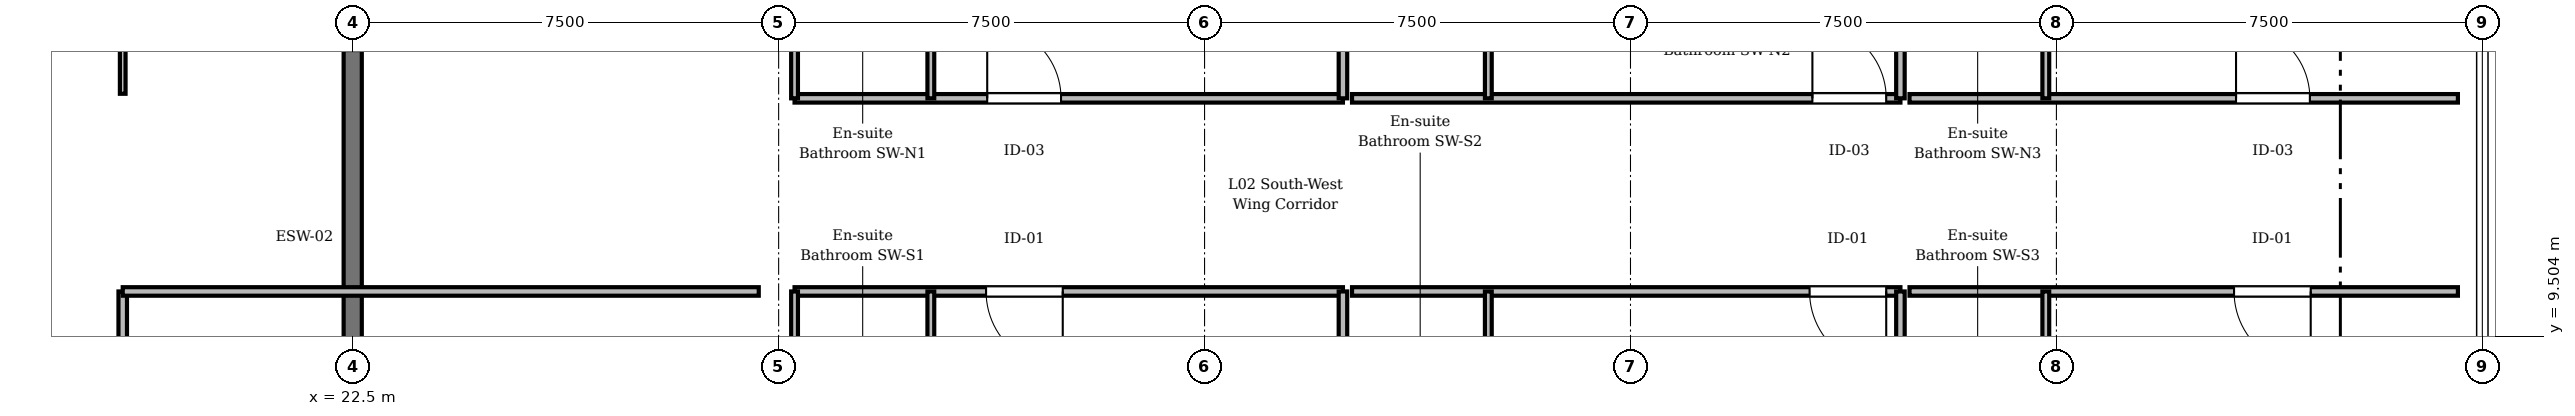
"""IFC4 building model, lengths in metres.
Left out: names, types, materials, properties, quantities, classifications, styles, units other than length and angle.
Written with IfcOpenShell. Run it as: python <this file> out.ifc"""

import sys

from ifc_helpers import new_model, si_unit, direction, frame, frame_2d, origin, place, context, subcontext, project, spatial, rectangle, extrude, element, fill, save


model = new_model("IFC4")
c1 = context("Model", 3, precision=1e-05, world=origin(), true_north=direction((0.0, 1.0)))
c2 = subcontext(c1, "Body", "Model", "MODEL_VIEW")
j1 = project(units=[si_unit("LENGTHUNIT", "METRE"), si_unit("PLANEANGLEUNIT", "RADIAN")], contexts=[c1])
p1 = place(None, origin())
s1 = spatial("IfcSite", under=j1, at=p1, CompositionType="ELEMENT")
p2 = place(p1, origin())
s2 = spatial("IfcBuilding", under=s1, at=p2, CompositionType="ELEMENT")
p3 = place(p2, frame((0.0, 0.0, 9.3)))
s3 = spatial("IfcBuildingStorey", under=s2, at=p3, CompositionType="ELEMENT", Elevation=9.3)
p4 = place(p3, frame((22.5, 7.95, 0.0), z_axis=(0.0, 0.0, 1.0), x_axis=(0.0, 1.0, 0.0)))
e1 = element("IfcWall", 1, at=p4, inside=s3, PredefinedType="SHEAR", context=c2, shape_type="SweptSolid", body=[
    extrude(rectangle(XDim=6.6, YDim=0.32, at=frame_2d((3.3, 0.0))), origin(), (0.0, 0.0, 1.0), 4.0),
])
p5 = place(p3, frame((18.45, 10.3, 0.0), z_axis=(0.0, 0.0, 1.0), x_axis=(0.0, -1.0, 0.0)))
e2 = element("IfcWall", 2, at=p5, inside=s3, PredefinedType="PARTITIONING", context=c2, shape_type="SweptSolid", body=[
    extrude(rectangle(XDim=9.95, YDim=0.15, at=frame_2d((4.975, 0.0))), origin(), (0.0, 0.0, 1.0), 4.535),
])
p6 = place(p5, frame((5.92, 0.0, 0.0)))
e3 = element("IfcOpeningElement", 3, at=p6, cuts=e2, PredefinedType="OPENING", context=c2, shape_type="SweptSolid", body=[
    extrude(rectangle(XDim=1.35, YDim=2.25, at=frame_2d((0.675, 1.125))), frame((0.0, 0.085, 0.0), z_axis=(0.0, -1.0, 0.0), x_axis=(1.0, 0.0, 0.0)), (0.0, 0.0, 1.0), 0.17),
])
p7 = place(p3, frame((18.45, 23.489, 0.0), z_axis=(0.0, 0.0, 1.0), x_axis=(0.0, -1.0, 0.0)))
e4 = element("IfcWall", 4, at=p7, inside=s3, PredefinedType="PARTITIONING", context=c2, shape_type="SweptSolid", body=[
    extrude(rectangle(XDim=9.709, YDim=0.1, at=frame_2d((4.854, 0.0))), origin(), (0.0, 0.0, 1.0), 4.135),
])
p8 = place(p7, frame((4.279, 0.0, 0.0)))
e5 = element("IfcOpeningElement", 5, at=p8, cuts=e4, PredefinedType="OPENING", context=c2, shape_type="SweptSolid", body=[
    extrude(rectangle(XDim=1.15, YDim=2.2, at=frame_2d((0.575, 1.1))), frame((0.0, 0.06, 0.0), z_axis=(0.0, -1.0, 0.0), x_axis=(1.0, 0.0, 0.0)), (0.0, 0.0, 1.0), 0.12),
])
p9 = place(p3, frame((39.937, 10.3, 0.0), z_axis=(0.0, 0.0, 1.0), x_axis=(-1.0, 0.0, 0.0)))
e6 = element("IfcWall", 6, at=p9, inside=s3, PredefinedType="PARTITIONING", context=c2, shape_type="SweptSolid", body=[
    extrude(rectangle(XDim=9.657, YDim=0.15, at=frame_2d((4.828, 0.0))), origin(), (0.0, 0.0, 1.0), 4.535),
])
p10 = place(p9, frame((4.934, 0.0, 0.0)))
e7 = element("IfcOpeningElement", 7, at=p10, cuts=e6, PredefinedType="OPENING", context=c2, shape_type="SweptSolid", body=[
    extrude(rectangle(XDim=1.35, YDim=2.25, at=frame_2d((0.675, 1.125))), frame((0.0, 0.085, 0.0), z_axis=(0.0, -1.0, 0.0), x_axis=(1.0, 0.0, 0.0)), (0.0, 0.0, 1.0), 0.17),
])
p11 = place(p3, frame((32.68, 8.3, 0.0), z_axis=(0.0, 0.0, 1.0), x_axis=(0.0, 1.0, 0.0)))
e8 = element("IfcWall", 8, at=p11, inside=s3, PredefinedType="PARTITIONING", context=c2, shape_type="SweptSolid", body=[
    extrude(rectangle(XDim=2.0, YDim=0.12, at=frame_2d((1.0, 0.0))), origin(), (0.0, 0.0, 1.0), 4.535),
])
p12 = place(p3, frame((30.28, 13.7, 0.0), z_axis=(0.0, 0.0, 1.0), x_axis=(1.0, 0.0, 0.0)))
e9 = element("IfcWall", 9, at=p12, inside=s3, PredefinedType="PARTITIONING", context=c2, shape_type="SweptSolid", body=[
    extrude(rectangle(XDim=9.657, YDim=0.15, at=frame_2d((4.828, 0.0))), origin(), (0.0, 0.0, 1.0), 4.535),
])
p13 = place(p12, frame((3.393, 0.0, 0.0)))
e10 = element("IfcOpeningElement", 10, at=p13, cuts=e9, PredefinedType="OPENING", context=c2, shape_type="SweptSolid", body=[
    extrude(rectangle(XDim=1.3, YDim=2.2, at=frame_2d((0.65, 1.1))), frame((0.0, 0.085, 0.0), z_axis=(0.0, -1.0, 0.0), x_axis=(1.0, 0.0, 0.0)), (0.0, 0.0, 1.0), 0.17),
])
p14 = place(p3, frame((32.68, 13.7, 0.0), z_axis=(0.0, 0.0, 1.0), x_axis=(0.0, 1.0, 0.0)))
e11 = element("IfcWall", 11, at=p14, inside=s3, PredefinedType="PARTITIONING", context=c2, shape_type="SweptSolid", body=[
    extrude(rectangle(XDim=2.0, YDim=0.12, at=frame_2d((1.0, 0.0))), origin(), (0.0, 0.0, 1.0), 4.535),
])
p15 = place(p3, frame((49.753, 10.3, 0.0), z_axis=(0.0, 0.0, 1.0), x_axis=(-1.0, 0.0, 0.0)))
e12 = element("IfcWall", 12, at=p15, inside=s3, PredefinedType="PARTITIONING", context=c2, shape_type="SweptSolid", body=[
    extrude(rectangle(XDim=9.657, YDim=0.15, at=frame_2d((4.828, 0.0))), origin(), (0.0, 0.0, 1.0), 4.535),
])
p16 = place(p15, frame((0.25, 0.0, 0.0)))
e13 = element("IfcOpeningElement", 13, at=p16, cuts=e12, PredefinedType="OPENING", context=c2, shape_type="SweptSolid", body=[
    extrude(rectangle(XDim=1.35, YDim=2.25, at=frame_2d((0.675, 1.125))), frame((0.0, 0.085, 0.0), z_axis=(0.0, -1.0, 0.0), x_axis=(1.0, 0.0, 0.0)), (0.0, 0.0, 1.0), 0.17),
])
p17 = place(p3, frame((42.497, 8.3, 0.0), z_axis=(0.0, 0.0, 1.0), x_axis=(0.0, 1.0, 0.0)))
e14 = element("IfcWall", 14, at=p17, inside=s3, PredefinedType="PARTITIONING", context=c2, shape_type="SweptSolid", body=[
    extrude(rectangle(XDim=2.0, YDim=0.12, at=frame_2d((1.0, 0.0))), origin(), (0.0, 0.0, 1.0), 4.535),
])
p18 = place(p3, frame((40.097, 13.7, 0.0), z_axis=(0.0, 0.0, 1.0), x_axis=(1.0, 0.0, 0.0)))
e15 = element("IfcWall", 15, at=p18, inside=s3, PredefinedType="PARTITIONING", context=c2, shape_type="SweptSolid", body=[
    extrude(rectangle(XDim=9.657, YDim=0.15, at=frame_2d((4.828, 0.0))), origin(), (0.0, 0.0, 1.0), 4.535),
])
p19 = place(p18, frame((8.107, 0.0, 0.0)))
e16 = element("IfcOpeningElement", 16, at=p19, cuts=e15, PredefinedType="OPENING", context=c2, shape_type="SweptSolid", body=[
    extrude(rectangle(XDim=1.3, YDim=2.2, at=frame_2d((0.65, 1.1))), frame((0.0, 0.085, 0.0), z_axis=(0.0, -1.0, 0.0), x_axis=(1.0, 0.0, 0.0)), (0.0, 0.0, 1.0), 0.17),
])
p20 = place(p3, frame((42.497, 13.7, 0.0), z_axis=(0.0, 0.0, 1.0), x_axis=(0.0, 1.0, 0.0)))
e17 = element("IfcWall", 17, at=p20, inside=s3, PredefinedType="PARTITIONING", context=c2, shape_type="SweptSolid", body=[
    extrude(rectangle(XDim=2.0, YDim=0.12, at=frame_2d((1.0, 0.0))), origin(), (0.0, 0.0, 1.0), 4.535),
])
p21 = place(p3, frame((59.57, 10.3, 0.0), z_axis=(0.0, 0.0, 1.0), x_axis=(-1.0, 0.0, 0.0)))
e18 = element("IfcWall", 18, at=p21, inside=s3, PredefinedType="PARTITIONING", context=c2, shape_type="SweptSolid", body=[
    extrude(rectangle(XDim=9.657, YDim=0.15, at=frame_2d((4.828, 0.0))), origin(), (0.0, 0.0, 1.0), 4.535),
])
p22 = place(p21, frame((2.592, 0.0, 0.0)))
e19 = element("IfcOpeningElement", 19, at=p22, cuts=e18, PredefinedType="OPENING", context=c2, shape_type="SweptSolid", body=[
    extrude(rectangle(XDim=1.35, YDim=2.25, at=frame_2d((0.675, 1.125))), frame((0.0, 0.085, 0.0), z_axis=(0.0, -1.0, 0.0), x_axis=(1.0, 0.0, 0.0)), (0.0, 0.0, 1.0), 0.17),
])
p23 = place(p3, frame((52.313, 8.3, 0.0), z_axis=(0.0, 0.0, 1.0), x_axis=(0.0, 1.0, 0.0)))
e20 = element("IfcWall", 20, at=p23, inside=s3, PredefinedType="PARTITIONING", context=c2, shape_type="SweptSolid", body=[
    extrude(rectangle(XDim=2.0, YDim=0.12, at=frame_2d((1.0, 0.0))), origin(), (0.0, 0.0, 1.0), 3.985),
])
p24 = place(p3, frame((49.913, 13.7, 0.0), z_axis=(0.0, 0.0, 1.0), x_axis=(1.0, 0.0, 0.0)))
e21 = element("IfcWall", 21, at=p24, inside=s3, PredefinedType="PARTITIONING", context=c2, shape_type="SweptSolid", body=[
    extrude(rectangle(XDim=9.657, YDim=0.15, at=frame_2d((4.828, 0.0))), origin(), (0.0, 0.0, 1.0), 4.535),
])
p25 = place(p24, frame((5.75, 0.0, 0.0)))
e22 = element("IfcOpeningElement", 22, at=p25, cuts=e21, PredefinedType="OPENING", context=c2, shape_type="SweptSolid", body=[
    extrude(rectangle(XDim=1.3, YDim=2.2, at=frame_2d((0.65, 1.1))), frame((0.0, 0.085, 0.0), z_axis=(0.0, -1.0, 0.0), x_axis=(1.0, 0.0, 0.0)), (0.0, 0.0, 1.0), 0.17),
])
p26 = place(p3, frame((52.313, 13.7, 0.0), z_axis=(0.0, 0.0, 1.0), x_axis=(0.0, 1.0, 0.0)))
e23 = element("IfcWall", 23, at=p26, inside=s3, PredefinedType="PARTITIONING", context=c2, shape_type="SweptSolid", body=[
    extrude(rectangle(XDim=2.0, YDim=0.12, at=frame_2d((1.0, 0.0))), origin(), (0.0, 0.0, 1.0), 3.985),
])
p27 = place(p3, frame((18.45, 10.3, 0.0), z_axis=(0.0, 0.0, 1.0), x_axis=(1.0, 0.0, 0.0)))
e24 = element("IfcWall", 24, at=p27, inside=s3, PredefinedType="PARTITIONING", context=c2, shape_type="SweptSolid", body=[
    extrude(rectangle(XDim=11.2, YDim=0.15, at=frame_2d((5.6, 0.0))), origin(), (0.0, 0.0, 1.0), 4.535),
])
p28 = place(p3, frame((39.937, 0.35, 0.0), z_axis=(0.0, 0.0, 1.0), x_axis=(0.0, 1.0, 0.0)))
e25 = element("IfcWall", 25, at=p28, inside=s3, PredefinedType="PARTITIONING", context=c2, shape_type="SweptSolid", body=[
    extrude(rectangle(XDim=9.95, YDim=0.15, at=frame_2d((4.975, 0.0))), origin(), (0.0, 0.0, 1.0), 4.535),
])
p29 = place(p3, frame((39.937, 13.7, 0.0), z_axis=(0.0, 0.0, 1.0), x_axis=(0.0, 1.0, 0.0)))
e26 = element("IfcWall", 26, at=p29, inside=s3, PredefinedType="PARTITIONING", context=c2, shape_type="SweptSolid", body=[
    extrude(rectangle(XDim=8.45, YDim=0.15, at=frame_2d((4.225, 0.0))), origin(), (0.0, 0.0, 1.0), 4.535),
])
p30 = place(p3, frame((49.753, 0.35, 0.0), z_axis=(0.0, 0.0, 1.0), x_axis=(0.0, 1.0, 0.0)))
e27 = element("IfcWall", 27, at=p30, inside=s3, PredefinedType="PARTITIONING", context=c2, shape_type="SweptSolid", body=[
    extrude(rectangle(XDim=9.95, YDim=0.15, at=frame_2d((4.975, 0.0))), origin(), (0.0, 0.0, 1.0), 4.535),
])
p31 = place(p3, frame((49.753, 13.7, 0.0), z_axis=(0.0, 0.0, 1.0), x_axis=(0.0, 1.0, 0.0)))
e28 = element("IfcWall", 28, at=p31, inside=s3, PredefinedType="PARTITIONING", context=c2, shape_type="SweptSolid", body=[
    extrude(rectangle(XDim=7.2, YDim=0.15, at=frame_2d((3.6, 0.0))), origin(), (0.0, 0.0, 1.0), 4.535),
])
p32 = place(p3, frame((30.28, 8.3, 0.0), z_axis=(0.0, 0.0, 1.0), x_axis=(0.0, 1.0, 0.0)))
e29 = element("IfcWall", 29, at=p32, inside=s3, PredefinedType="PARTITIONING", context=c2, shape_type="SweptSolid", body=[
    extrude(rectangle(XDim=2.0, YDim=0.12, at=frame_2d((1.0, 0.0))), origin(), (0.0, 0.0, 1.0), 4.035),
])
p33 = place(p3, frame((30.28, 13.7, 0.0), z_axis=(0.0, 0.0, 1.0), x_axis=(0.0, 1.0, 0.0)))
e30 = element("IfcWall", 30, at=p33, inside=s3, PredefinedType="PARTITIONING", context=c2, shape_type="SweptSolid", body=[
    extrude(rectangle(XDim=2.0, YDim=0.12, at=frame_2d((1.0, 0.0))), origin(), (0.0, 0.0, 1.0), 3.985),
])
p34 = place(p10, origin())
e31 = element("IfcDoor", 31, at=p34, inside=s3, OperationType="SINGLE_SWING_LEFT", PredefinedType="DOOR", context=c2, shape_type="SweptSolid", body=[
    extrude(rectangle(XDim=1.35, YDim=2.25, at=frame_2d((0.675, 1.125))), frame((0.0, 0.025, 0.0), z_axis=(0.0, -1.0, 0.0), x_axis=(1.0, 0.0, 0.0)), (0.0, 0.0, 1.0), 0.05),
])
fill(e7, e31)
p35 = place(p13, origin())
e32 = element("IfcDoor", 32, at=p35, inside=s3, OperationType="SINGLE_SWING_LEFT", PredefinedType="DOOR", context=c2, shape_type="SweptSolid", body=[
    extrude(rectangle(XDim=1.3, YDim=2.2, at=frame_2d((0.65, 1.1))), frame((0.0, 0.025, 0.0), z_axis=(0.0, -1.0, 0.0), x_axis=(1.0, 0.0, 0.0)), (0.0, 0.0, 1.0), 0.05),
])
fill(e10, e32)
p36 = place(p16, origin())
e33 = element("IfcDoor", 33, at=p36, inside=s3, OperationType="SINGLE_SWING_LEFT", PredefinedType="DOOR", context=c2, shape_type="SweptSolid", body=[
    extrude(rectangle(XDim=1.35, YDim=2.25, at=frame_2d((0.675, 1.125))), frame((0.0, 0.025, 0.0), z_axis=(0.0, -1.0, 0.0), x_axis=(1.0, 0.0, 0.0)), (0.0, 0.0, 1.0), 0.05),
])
fill(e13, e33)
p37 = place(p19, origin())
e34 = element("IfcDoor", 34, at=p37, inside=s3, OperationType="SINGLE_SWING_LEFT", PredefinedType="DOOR", context=c2, shape_type="SweptSolid", body=[
    extrude(rectangle(XDim=1.3, YDim=2.2, at=frame_2d((0.65, 1.1))), frame((0.0, 0.025, 0.0), z_axis=(0.0, -1.0, 0.0), x_axis=(1.0, 0.0, 0.0)), (0.0, 0.0, 1.0), 0.05),
])
fill(e16, e34)
p38 = place(p22, origin())
e35 = element("IfcDoor", 35, at=p38, inside=s3, OperationType="SINGLE_SWING_LEFT", PredefinedType="DOOR", context=c2, shape_type="SweptSolid", body=[
    extrude(rectangle(XDim=1.35, YDim=2.25, at=frame_2d((0.675, 1.125))), frame((0.0, 0.025, 0.0), z_axis=(0.0, -1.0, 0.0), x_axis=(1.0, 0.0, 0.0)), (0.0, 0.0, 1.0), 0.05),
])
fill(e19, e35)
p39 = place(p25, origin())
e36 = element("IfcDoor", 36, at=p39, inside=s3, OperationType="SINGLE_SWING_LEFT", PredefinedType="DOOR", context=c2, shape_type="SweptSolid", body=[
    extrude(rectangle(XDim=1.3, YDim=2.2, at=frame_2d((0.65, 1.1))), frame((0.0, 0.025, 0.0), z_axis=(0.0, -1.0, 0.0), x_axis=(1.0, 0.0, 0.0)), (0.0, 0.0, 1.0), 0.05),
])
fill(e22, e36)
save(model, sys.argv[1])
